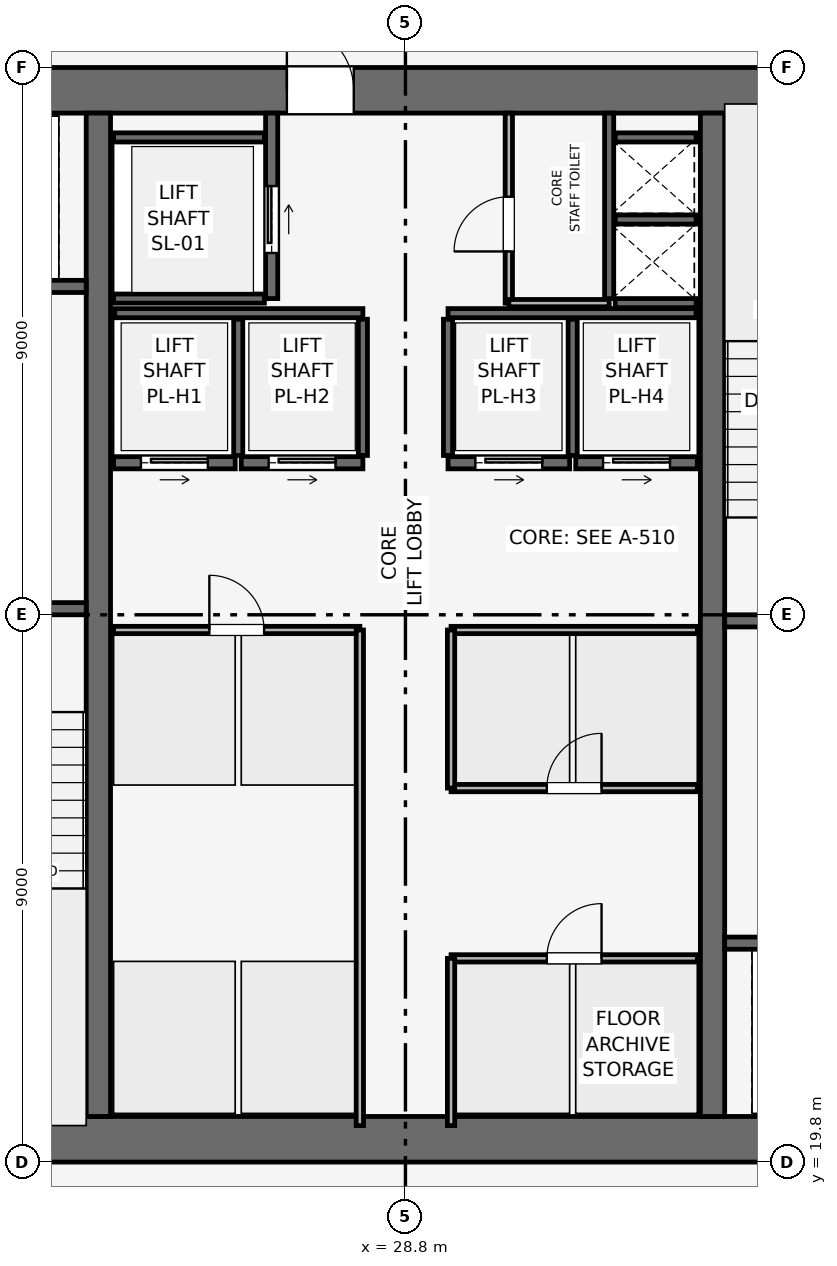
"""IFC4 building model, lengths in metres.
Left out: names, types, materials, properties, quantities, classifications, styles, units other than length and angle.
Written with IfcOpenShell. Run it as: python <this file> out.ifc"""

import sys

from ifc_helpers import new_model, si_unit, direction, frame, frame_2d, origin, place, context, subcontext, project, spatial, rectangle, extrude, element, fill, save


model = new_model("IFC4")
c1 = context("Model", 3, precision=1e-05, world=origin(), true_north=direction((0.0, 1.0)))
c2 = subcontext(c1, "Body", "Model", "MODEL_VIEW")
j1 = project(units=[si_unit("LENGTHUNIT", "METRE"), si_unit("PLANEANGLEUNIT", "RADIAN")], contexts=[c1])
p1 = place(None, origin())
s1 = spatial("IfcSite", under=j1, at=p1, CompositionType="ELEMENT")
p2 = place(p1, origin())
s2 = spatial("IfcBuilding", under=s1, at=p2, CompositionType="ELEMENT")
p3 = place(p2, frame((0.0, 0.0, 254.1)))
s3 = spatial("IfcBuildingStorey", under=s2, at=p3, CompositionType="ELEMENT", Elevation=254.1)
p4 = place(p3, frame((19.8, 20.175, 0.0), z_axis=(0.0, 0.0, 1.0), x_axis=(1.0, 0.0, 0.0)))
e1 = element("IfcWall", 1, at=p4, inside=s3, PredefinedType="SHEAR", context=c2, shape_type="SweptSolid", body=[
    extrude(rectangle(XDim=18.0, YDim=0.75, at=frame_2d((9.0, 0.0))), origin(), (0.0, 0.0, 1.0), 3.75),
])
p5 = place(p3, frame((19.8, 37.425, 0.0), z_axis=(0.0, 0.0, 1.0), x_axis=(1.0, 0.0, 0.0)))
e2 = element("IfcWall", 2, at=p5, inside=s3, PredefinedType="SHEAR", context=c2, shape_type="SweptSolid", body=[
    extrude(rectangle(XDim=18.0, YDim=0.75, at=frame_2d((9.0, 0.0))), origin(), (0.0, 0.0, 1.0), 3.75),
])
p6 = place(p5, frame((7.05, 0.0, 0.0)))
e3 = element("IfcOpeningElement", 3, at=p6, cuts=e2, PredefinedType="OPENING", context=c2, shape_type="SweptSolid", body=[
    extrude(rectangle(XDim=1.1, YDim=2.15, at=frame_2d((0.55, 1.075))), frame((0.0, 0.385, 0.0), z_axis=(0.0, -1.0, 0.0), x_axis=(1.0, 0.0, 0.0)), (0.0, 0.0, 1.0), 0.77),
])
for number, where, z_axis, x_axis in (
    (4, (23.75, 20.55, 0.0), (0.0, 0.0, 1.0), (0.0, 1.0, 0.0)),
    (5, (33.85, 20.55, 0.0), (0.0, 0.0, 1.0), (0.0, 1.0, 0.0)),
):
    element("IfcWall", number, at=place(p3, frame(where, z_axis=z_axis, x_axis=x_axis)), inside=s3, PredefinedType="SHEAR", context=c2, shape_type="SweptSolid", body=[
        extrude(rectangle(XDim=16.5, YDim=0.4, at=frame_2d((8.25, 0.0))), origin(), (0.0, 0.0, 1.0), 3.75),
    ])
p7 = place(p3, frame((20.4, 28.9, 0.0), z_axis=(0.0, 0.0, 1.0), x_axis=(1.0, 0.0, 0.0)))
e6 = element("IfcWall", 6, at=p7, inside=s3, PredefinedType="SHEAR", context=c2, shape_type="SweptSolid", body=[
    extrude(rectangle(XDim=3.15, YDim=0.2, at=frame_2d((1.575, 0.0))), origin(), (0.0, 0.0, 1.0), 3.5),
])
p8 = place(p7, frame((0.8, 0.0, 0.0)))
e7 = element("IfcOpeningElement", 7, at=p8, cuts=e6, PredefinedType="OPENING", context=c2, shape_type="SweptSolid", body=[
    extrude(rectangle(XDim=1.0, YDim=2.1, at=frame_2d((0.5, 1.05))), frame((0.0, 0.11, 0.0), z_axis=(0.0, -1.0, 0.0), x_axis=(1.0, 0.0, 0.0)), (0.0, 0.0, 1.0), 0.22),
])
p9 = place(p3, frame((34.05, 28.7, 0.0), z_axis=(0.0, 0.0, 1.0), x_axis=(1.0, 0.0, 0.0)))
e8 = element("IfcWall", 8, at=p9, inside=s3, PredefinedType="SHEAR", context=c2, shape_type="SweptSolid", body=[
    extrude(rectangle(XDim=3.15, YDim=0.2, at=frame_2d((1.575, 0.0))), origin(), (0.0, 0.0, 1.0), 3.5),
])
p10 = place(p9, frame((0.8, 0.0, 0.0)))
e9 = element("IfcOpeningElement", 9, at=p10, cuts=e8, PredefinedType="OPENING", context=c2, shape_type="SweptSolid", body=[
    extrude(rectangle(XDim=1.0, YDim=2.1, at=frame_2d((0.5, 1.05))), frame((0.0, 0.11, 0.0), z_axis=(0.0, -1.0, 0.0), x_axis=(1.0, 0.0, 0.0)), (0.0, 0.0, 1.0), 0.22),
])
p11 = place(p3, frame((32.15, 34.0, 0.0), z_axis=(0.0, 0.0, 1.0), x_axis=(0.0, 1.0, 0.0)))
e10 = element("IfcWall", 10, at=p11, inside=s3, PredefinedType="SHEAR", context=c2, shape_type="SweptSolid", body=[
    extrude(rectangle(XDim=3.05, YDim=0.15, at=frame_2d((1.525, 0.0))), origin(), (0.0, 0.0, 1.0), 3.5),
])
for number, where, z_axis, x_axis in (
    (11, (32.25, 33.925, 0.0), (0.0, 0.0, 1.0), (1.0, 0.0, 0.0)),
    (12, (32.25, 35.3, 0.0), (0.0, 0.0, 1.0), (1.0, 0.0, 0.0)),
):
    element("IfcWall", number, at=place(p3, frame(where, z_axis=z_axis, x_axis=x_axis)), inside=s3, PredefinedType="SHEAR", context=c2, shape_type="SweptSolid", body=[
        extrude(rectangle(XDim=1.33, YDim=0.15, at=frame_2d((0.665, 0.0))), origin(), (0.0, 0.0, 1.0), 3.5),
    ])
p12 = place(p3, frame((20.5, 34.2, 0.0), z_axis=(0.0, 0.0, 1.0), x_axis=(1.0, 0.0, 0.0)))
e13 = element("IfcWall", 13, at=p12, inside=s3, PredefinedType="SHEAR", context=c2, shape_type="SweptSolid", body=[
    extrude(rectangle(XDim=3.05, YDim=0.2, at=frame_2d((1.525, 0.0))), origin(), (0.0, 0.0, 1.0), 3.5),
])
p13 = place(p12, frame((0.75, 0.0, 0.0)))
e14 = element("IfcOpeningElement", 14, at=p13, cuts=e13, PredefinedType="OPENING", context=c2, shape_type="SweptSolid", body=[
    extrude(rectangle(XDim=1.1, YDim=2.15, at=frame_2d((0.55, 1.075))), frame((0.0, 0.11, 0.0), z_axis=(0.0, -1.0, 0.0), x_axis=(1.0, 0.0, 0.0)), (0.0, 0.0, 1.0), 0.22),
])
p14 = place(p3, frame((34.05, 23.4, 0.0), z_axis=(0.0, 0.0, 1.0), x_axis=(1.0, 0.0, 0.0)))
e15 = element("IfcWall", 15, at=p14, inside=s3, PredefinedType="SHEAR", context=c2, shape_type="SweptSolid", body=[
    extrude(rectangle(XDim=3.05, YDim=0.2, at=frame_2d((1.525, 0.0))), origin(), (0.0, 0.0, 1.0), 3.5),
])
p15 = place(p14, frame((1.2, 0.0, 0.0)))
e16 = element("IfcOpeningElement", 16, at=p15, cuts=e15, PredefinedType="OPENING", context=c2, shape_type="SweptSolid", body=[
    extrude(rectangle(XDim=1.1, YDim=2.15, at=frame_2d((0.55, 1.075))), frame((0.0, 0.11, 0.0), z_axis=(0.0, -1.0, 0.0), x_axis=(1.0, 0.0, 0.0)), (0.0, 0.0, 1.0), 0.22),
])
p16 = place(p3, frame((26.6, 34.0, 0.0), z_axis=(0.0, 0.0, 1.0), x_axis=(0.0, 1.0, 0.0)))
e17 = element("IfcWall", 17, at=p16, inside=s3, PredefinedType="SHEAR", context=c2, shape_type="SweptSolid", body=[
    extrude(rectangle(XDim=3.05, YDim=0.2, at=frame_2d((1.525, 0.0))), origin(), (0.0, 0.0, 1.0), 3.5),
])
p17 = place(p16, frame((0.75, 0.0, 0.0)))
e18 = element("IfcOpeningElement", 18, at=p17, cuts=e17, PredefinedType="OPENING", context=c2, shape_type="SweptSolid", body=[
    extrude(rectangle(XDim=1.1, YDim=2.15, at=frame_2d((0.55, 1.075))), frame((0.0, 0.11, 0.0), z_axis=(0.0, -1.0, 0.0), x_axis=(1.0, 0.0, 0.0)), (0.0, 0.0, 1.0), 0.22),
])
for number, where, z_axis, x_axis in (
    (19, (24.0, 34.0, 0.0), (0.0, 0.0, 1.0), (1.0, 0.0, 0.0)),
    (20, (24.0, 36.65, 0.0), (0.0, 0.0, 1.0), (1.0, 0.0, 0.0)),
):
    element("IfcWall", number, at=place(p3, frame(where, z_axis=z_axis, x_axis=x_axis)), inside=s3, PredefinedType="SHEAR", context=c2, shape_type="SweptSolid", body=[
        extrude(rectangle(XDim=2.48, YDim=0.15, at=frame_2d((1.24, 0.0))), origin(), (0.0, 0.0, 1.0), 3.5),
    ])
p18 = place(p3, frame((24.0, 31.3, 0.0), z_axis=(0.0, 0.0, 1.0), x_axis=(1.0, 0.0, 0.0)))
e21 = element("IfcWall", 21, at=p18, inside=s3, PredefinedType="SHEAR", context=c2, shape_type="SweptSolid", body=[
    extrude(rectangle(XDim=2.0, YDim=0.2, at=frame_2d((1.0, 0.0))), origin(), (0.0, 0.0, 1.0), 3.5),
])
p19 = place(p18, frame((0.45, 0.0, 0.0)))
e22 = element("IfcOpeningElement", 22, at=p19, cuts=e21, PredefinedType="OPENING", context=c2, shape_type="SweptSolid", body=[
    extrude(rectangle(XDim=1.1, YDim=2.15, at=frame_2d((0.55, 1.075))), frame((0.0, 0.11, 0.0), z_axis=(0.0, -1.0, 0.0), x_axis=(1.0, 0.0, 0.0)), (0.0, 0.0, 1.0), 0.22),
])
p20 = place(p3, frame((26.1, 31.3, 0.0), z_axis=(0.0, 0.0, 1.0), x_axis=(1.0, 0.0, 0.0)))
e23 = element("IfcWall", 23, at=p20, inside=s3, PredefinedType="SHEAR", context=c2, shape_type="SweptSolid", body=[
    extrude(rectangle(XDim=2.0, YDim=0.2, at=frame_2d((1.0, 0.0))), origin(), (0.0, 0.0, 1.0), 3.5),
])
p21 = place(p20, frame((0.45, 0.0, 0.0)))
e24 = element("IfcOpeningElement", 24, at=p21, cuts=e23, PredefinedType="OPENING", context=c2, shape_type="SweptSolid", body=[
    extrude(rectangle(XDim=1.1, YDim=2.15, at=frame_2d((0.55, 1.075))), frame((0.0, 0.11, 0.0), z_axis=(0.0, -1.0, 0.0), x_axis=(1.0, 0.0, 0.0)), (0.0, 0.0, 1.0), 0.22),
])
p22 = place(p3, frame((29.5, 31.3, 0.0), z_axis=(0.0, 0.0, 1.0), x_axis=(1.0, 0.0, 0.0)))
e25 = element("IfcWall", 25, at=p22, inside=s3, PredefinedType="SHEAR", context=c2, shape_type="SweptSolid", body=[
    extrude(rectangle(XDim=2.0, YDim=0.2, at=frame_2d((1.0, 0.0))), origin(), (0.0, 0.0, 1.0), 3.5),
])
p23 = place(p22, frame((0.45, 0.0, 0.0)))
e26 = element("IfcOpeningElement", 26, at=p23, cuts=e25, PredefinedType="OPENING", context=c2, shape_type="SweptSolid", body=[
    extrude(rectangle(XDim=1.1, YDim=2.15, at=frame_2d((0.55, 1.075))), frame((0.0, 0.11, 0.0), z_axis=(0.0, -1.0, 0.0), x_axis=(1.0, 0.0, 0.0)), (0.0, 0.0, 1.0), 0.22),
])
p24 = place(p3, frame((31.6, 31.3, 0.0), z_axis=(0.0, 0.0, 1.0), x_axis=(1.0, 0.0, 0.0)))
e27 = element("IfcWall", 27, at=p24, inside=s3, PredefinedType="SHEAR", context=c2, shape_type="SweptSolid", body=[
    extrude(rectangle(XDim=2.0, YDim=0.2, at=frame_2d((1.0, 0.0))), origin(), (0.0, 0.0, 1.0), 3.5),
])
p25 = place(p24, frame((0.45, 0.0, 0.0)))
e28 = element("IfcOpeningElement", 28, at=p25, cuts=e27, PredefinedType="OPENING", context=c2, shape_type="SweptSolid", body=[
    extrude(rectangle(XDim=1.1, YDim=2.15, at=frame_2d((0.55, 1.075))), frame((0.0, 0.11, 0.0), z_axis=(0.0, -1.0, 0.0), x_axis=(1.0, 0.0, 0.0)), (0.0, 0.0, 1.0), 0.22),
])
p26 = place(p3, frame((32.25, 36.65, 0.0), z_axis=(0.0, 0.0, 1.0), x_axis=(1.0, 0.0, 0.0)))
e29 = element("IfcWall", 29, at=p26, inside=s3, PredefinedType="SHEAR", context=c2, shape_type="SweptSolid", body=[
    extrude(rectangle(XDim=1.33, YDim=0.15, at=frame_2d((0.665, 0.0))), origin(), (0.0, 0.0, 1.0), 3.5),
])
for number, where, z_axis, x_axis in (
    (30, (24.02, 33.76, 0.0), (0.0, 0.0, 1.0), (1.0, 0.0, 0.0)),
    (31, (29.5, 33.76, 0.0), (0.0, 0.0, 1.0), (1.0, 0.0, 0.0)),
):
    element("IfcWall", number, at=place(p3, frame(where, z_axis=z_axis, x_axis=x_axis)), inside=s3, PredefinedType="SHEAR", context=c2, shape_type="SweptSolid", body=[
        extrude(rectangle(XDim=4.08, YDim=0.15, at=frame_2d((2.04, 0.0))), origin(), (0.0, 0.0, 1.0), 3.5),
    ])
for number, where, z_axis, x_axis in (
    (32, (26.05, 31.42, 0.0), (0.0, 0.0, 1.0), (0.0, 1.0, 0.0)),
    (33, (28.1, 31.42, 0.0), (0.0, 0.0, 1.0), (0.0, 1.0, 0.0)),
    (34, (29.5, 31.42, 0.0), (0.0, 0.0, 1.0), (0.0, 1.0, 0.0)),
    (35, (31.55, 31.42, 0.0), (0.0, 0.0, 1.0), (0.0, 1.0, 0.0)),
):
    element("IfcWall", number, at=place(p3, frame(where, z_axis=z_axis, x_axis=x_axis)), inside=s3, PredefinedType="SHEAR", context=c2, shape_type="SweptSolid", body=[
        extrude(rectangle(XDim=2.24, YDim=0.15, at=frame_2d((1.12, 0.0))), origin(), (0.0, 0.0, 1.0), 3.5),
    ])
p27 = place(p3, frame((30.5, 33.925, 0.0), z_axis=(0.0, 0.0, 1.0), x_axis=(0.0, 1.0, 0.0)))
e36 = element("IfcWall", 36, at=p27, inside=s3, PredefinedType="PARTITIONING", context=c2, shape_type="SweptSolid", body=[
    extrude(rectangle(XDim=3.125, YDim=0.12, at=frame_2d((1.562, 0.0))), origin(), (0.0, 0.0, 1.0), 3.5),
])
p28 = place(p27, frame((0.85, 0.0, 0.0)))
e37 = element("IfcOpeningElement", 37, at=p28, cuts=e36, PredefinedType="OPENING", context=c2, shape_type="SweptSolid", body=[
    extrude(rectangle(XDim=0.9, YDim=2.1, at=frame_2d((0.45, 1.05))), frame((0.0, 0.07, 0.0), z_axis=(0.0, -1.0, 0.0), x_axis=(1.0, 0.0, 0.0)), (0.0, 0.0, 1.0), 0.14),
])
p29 = place(p3, frame((30.5, 33.925, 0.0), z_axis=(0.0, 0.0, 1.0), x_axis=(1.0, 0.0, 0.0)))
e38 = element("IfcWall", 38, at=p29, inside=s3, PredefinedType="PARTITIONING", context=c2, shape_type="SweptSolid", body=[
    extrude(rectangle(XDim=1.65, YDim=0.12, at=frame_2d((0.825, 0.0))), origin(), (0.0, 0.0, 1.0), 3.5),
])
p30 = place(p3, frame((24.0, 28.55, 0.0), z_axis=(0.0, 0.0, 1.0), x_axis=(1.0, 0.0, 0.0)))
e39 = element("IfcWall", 39, at=p30, inside=s3, PredefinedType="PARTITIONING", context=c2, shape_type="SweptSolid", body=[
    extrude(rectangle(XDim=4.05, YDim=0.12, at=frame_2d((2.025, 0.0))), origin(), (0.0, 0.0, 1.0), 3.5),
])
p31 = place(p30, frame((1.575, 0.0, 0.0)))
e40 = element("IfcOpeningElement", 40, at=p31, cuts=e39, PredefinedType="OPENING", context=c2, shape_type="SweptSolid", body=[
    extrude(rectangle(XDim=0.9, YDim=2.1, at=frame_2d((0.45, 1.05))), frame((0.0, 0.07, 0.0), z_axis=(0.0, -1.0, 0.0), x_axis=(1.0, 0.0, 0.0)), (0.0, 0.0, 1.0), 0.14),
])
p32 = place(p3, frame((28.05, 20.4, 0.0), z_axis=(0.0, 0.0, 1.0), x_axis=(0.0, 1.0, 0.0)))
e41 = element("IfcWall", 41, at=p32, inside=s3, PredefinedType="PARTITIONING", context=c2, shape_type="SweptSolid", body=[
    extrude(rectangle(XDim=8.15, YDim=0.12, at=frame_2d((4.075, 0.0))), origin(), (0.0, 0.0, 1.0), 3.5),
])
p33 = place(p3, frame((29.55, 23.15, 0.0), z_axis=(0.0, 0.0, 1.0), x_axis=(1.0, 0.0, 0.0)))
e42 = element("IfcWall", 42, at=p33, inside=s3, PredefinedType="PARTITIONING", context=c2, shape_type="SweptSolid", body=[
    extrude(rectangle(XDim=4.05, YDim=0.12, at=frame_2d((2.025, 0.0))), origin(), (0.0, 0.0, 1.0), 3.5),
])
p34 = place(p33, frame((1.575, 0.0, 0.0)))
e43 = element("IfcOpeningElement", 43, at=p34, cuts=e42, PredefinedType="OPENING", context=c2, shape_type="SweptSolid", body=[
    extrude(rectangle(XDim=0.9, YDim=2.1, at=frame_2d((0.45, 1.05))), frame((0.0, 0.07, 0.0), z_axis=(0.0, -1.0, 0.0), x_axis=(1.0, 0.0, 0.0)), (0.0, 0.0, 1.0), 0.14),
])
p35 = place(p3, frame((29.55, 20.4, 0.0), z_axis=(0.0, 0.0, 1.0), x_axis=(0.0, 1.0, 0.0)))
e44 = element("IfcWall", 44, at=p35, inside=s3, PredefinedType="PARTITIONING", context=c2, shape_type="SweptSolid", body=[
    extrude(rectangle(XDim=2.75, YDim=0.12, at=frame_2d((1.375, 0.0))), origin(), (0.0, 0.0, 1.0), 3.5),
])
p36 = place(p3, frame((29.55, 25.95, 0.0), z_axis=(0.0, 0.0, 1.0), x_axis=(1.0, 0.0, 0.0)))
e45 = element("IfcWall", 45, at=p36, inside=s3, PredefinedType="PARTITIONING", context=c2, shape_type="SweptSolid", body=[
    extrude(rectangle(XDim=4.05, YDim=0.12, at=frame_2d((2.025, 0.0))), origin(), (0.0, 0.0, 1.0), 3.5),
])
p37 = place(p36, frame((1.575, 0.0, 0.0)))
e46 = element("IfcOpeningElement", 46, at=p37, cuts=e45, PredefinedType="OPENING", context=c2, shape_type="SweptSolid", body=[
    extrude(rectangle(XDim=0.9, YDim=2.1, at=frame_2d((0.45, 1.05))), frame((0.0, 0.07, 0.0), z_axis=(0.0, -1.0, 0.0), x_axis=(1.0, 0.0, 0.0)), (0.0, 0.0, 1.0), 0.14),
])
p38 = place(p3, frame((29.55, 28.55, 0.0), z_axis=(0.0, 0.0, 1.0), x_axis=(1.0, 0.0, 0.0)))
e47 = element("IfcWall", 47, at=p38, inside=s3, PredefinedType="PARTITIONING", context=c2, shape_type="SweptSolid", body=[
    extrude(rectangle(XDim=4.05, YDim=0.12, at=frame_2d((2.025, 0.0))), origin(), (0.0, 0.0, 1.0), 3.5),
])
p39 = place(p3, frame((29.55, 25.95, 0.0), z_axis=(0.0, 0.0, 1.0), x_axis=(0.0, 1.0, 0.0)))
e48 = element("IfcWall", 48, at=p39, inside=s3, PredefinedType="PARTITIONING", context=c2, shape_type="SweptSolid", body=[
    extrude(rectangle(XDim=2.6, YDim=0.12, at=frame_2d((1.3, 0.0))), origin(), (0.0, 0.0, 1.0), 3.5),
])
p40 = place(p17, origin())
e49 = element("IfcDoor", 49, at=p40, inside=s3, OperationType="SLIDING_TO_RIGHT", PredefinedType="DOOR", context=c2, shape_type="SweptSolid", body=[
    extrude(rectangle(XDim=1.1, YDim=2.15, at=frame_2d((0.55, 1.075))), frame((0.0, 0.025, 0.0), z_axis=(0.0, -1.0, 0.0), x_axis=(1.0, 0.0, 0.0)), (0.0, 0.0, 1.0), 0.05),
])
fill(e18, e49)
p41 = place(p19, origin())
e50 = element("IfcDoor", 50, at=p41, inside=s3, OperationType="SLIDING_TO_RIGHT", PredefinedType="DOOR", context=c2, shape_type="SweptSolid", body=[
    extrude(rectangle(XDim=1.1, YDim=2.15, at=frame_2d((0.55, 1.075))), frame((0.0, 0.025, 0.0), z_axis=(0.0, -1.0, 0.0), x_axis=(1.0, 0.0, 0.0)), (0.0, 0.0, 1.0), 0.05),
])
fill(e22, e50)
p42 = place(p21, origin())
e51 = element("IfcDoor", 51, at=p42, inside=s3, OperationType="SLIDING_TO_RIGHT", PredefinedType="DOOR", context=c2, shape_type="SweptSolid", body=[
    extrude(rectangle(XDim=1.1, YDim=2.15, at=frame_2d((0.55, 1.075))), frame((0.0, 0.025, 0.0), z_axis=(0.0, -1.0, 0.0), x_axis=(1.0, 0.0, 0.0)), (0.0, 0.0, 1.0), 0.05),
])
fill(e24, e51)
p43 = place(p23, origin())
e52 = element("IfcDoor", 52, at=p43, inside=s3, OperationType="SLIDING_TO_RIGHT", PredefinedType="DOOR", context=c2, shape_type="SweptSolid", body=[
    extrude(rectangle(XDim=1.1, YDim=2.15, at=frame_2d((0.55, 1.075))), frame((0.0, 0.025, 0.0), z_axis=(0.0, -1.0, 0.0), x_axis=(1.0, 0.0, 0.0)), (0.0, 0.0, 1.0), 0.05),
])
fill(e26, e52)
p44 = place(p25, origin())
e53 = element("IfcDoor", 53, at=p44, inside=s3, OperationType="SLIDING_TO_RIGHT", PredefinedType="DOOR", context=c2, shape_type="SweptSolid", body=[
    extrude(rectangle(XDim=1.1, YDim=2.15, at=frame_2d((0.55, 1.075))), frame((0.0, 0.025, 0.0), z_axis=(0.0, -1.0, 0.0), x_axis=(1.0, 0.0, 0.0)), (0.0, 0.0, 1.0), 0.05),
])
fill(e28, e53)
p45 = place(p28, origin())
e54 = element("IfcDoor", 54, at=p45, inside=s3, OperationType="SINGLE_SWING_LEFT", PredefinedType="DOOR", context=c2, shape_type="SweptSolid", body=[
    extrude(rectangle(XDim=0.9, YDim=2.1, at=frame_2d((0.45, 1.05))), frame((0.0, 0.025, 0.0), z_axis=(0.0, -1.0, 0.0), x_axis=(1.0, 0.0, 0.0)), (0.0, 0.0, 1.0), 0.05),
])
fill(e37, e54)
p46 = place(p31, origin())
e55 = element("IfcDoor", 55, at=p46, inside=s3, OperationType="SINGLE_SWING_LEFT", PredefinedType="DOOR", context=c2, shape_type="SweptSolid", body=[
    extrude(rectangle(XDim=0.9, YDim=2.1, at=frame_2d((0.45, 1.05))), frame((0.0, 0.025, 0.0), z_axis=(0.0, -1.0, 0.0), x_axis=(1.0, 0.0, 0.0)), (0.0, 0.0, 1.0), 0.05),
])
fill(e40, e55)
p47 = place(p34, origin())
e56 = element("IfcDoor", 56, at=p47, inside=s3, OperationType="SINGLE_SWING_RIGHT", PredefinedType="DOOR", context=c2, shape_type="SweptSolid", body=[
    extrude(rectangle(XDim=0.9, YDim=2.1, at=frame_2d((0.45, 1.05))), frame((0.0, 0.025, 0.0), z_axis=(0.0, -1.0, 0.0), x_axis=(1.0, 0.0, 0.0)), (0.0, 0.0, 1.0), 0.05),
])
fill(e43, e56)
p48 = place(p37, origin())
e57 = element("IfcDoor", 57, at=p48, inside=s3, OperationType="SINGLE_SWING_RIGHT", PredefinedType="DOOR", context=c2, shape_type="SweptSolid", body=[
    extrude(rectangle(XDim=0.9, YDim=2.1, at=frame_2d((0.45, 1.05))), frame((0.0, 0.025, 0.0), z_axis=(0.0, -1.0, 0.0), x_axis=(1.0, 0.0, 0.0)), (0.0, 0.0, 1.0), 0.05),
])
fill(e46, e57)
p49 = place(p6, origin())
e58 = element("IfcDoor", 58, at=p49, inside=s3, OperationType="SINGLE_SWING_LEFT", PredefinedType="DOOR", context=c2, shape_type="SweptSolid", body=[
    extrude(rectangle(XDim=1.1, YDim=2.15, at=frame_2d((0.55, 1.075))), frame((0.0, 0.025, 0.0), z_axis=(0.0, -1.0, 0.0), x_axis=(1.0, 0.0, 0.0)), (0.0, 0.0, 1.0), 0.05),
])
fill(e3, e58)
save(model, sys.argv[1])
